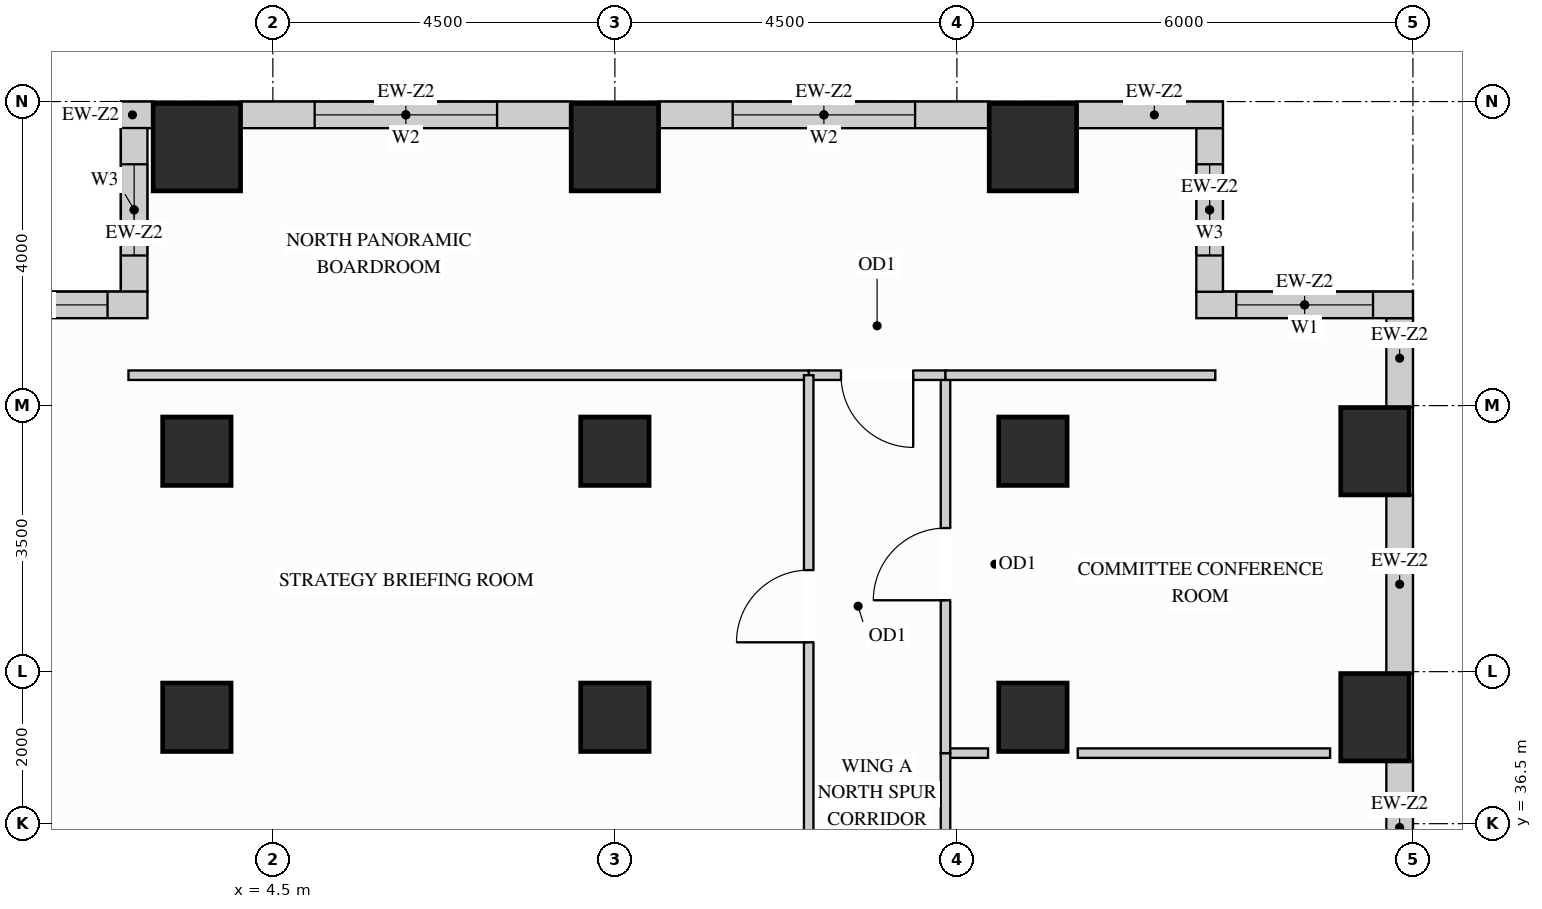
"""IFC4 building model, lengths in metres.
Left out: names, types, materials, properties, quantities, classifications, styles, units other than length and angle.
Written with IfcOpenShell. Run it as: python <this file> out.ifc"""

import sys

from ifc_helpers import new_model, si_unit, direction, frame, frame_2d, origin, origin_2d, place, context, subcontext, project, spatial, rectangle, extrude, source, transform, mapped, element, fill, save


model = new_model("IFC4")
c1 = context("Model", 3, precision=1e-05, world=origin(), true_north=direction((0.0, 1.0)))
c2 = subcontext(c1, "Body", "Model", "MODEL_VIEW")
j1 = project(units=[si_unit("LENGTHUNIT", "METRE"), si_unit("PLANEANGLEUNIT", "RADIAN")], contexts=[c1])
p1 = place(None, origin())
s1 = spatial("IfcSite", under=j1, at=p1, CompositionType="ELEMENT")
p2 = place(p1, origin())
s2 = spatial("IfcBuilding", under=s1, at=p2, CompositionType="ELEMENT")
p3 = place(p2, frame((0.0, 0.0, 88.2)))
s3 = spatial("IfcBuildingStorey", under=s2, at=p3, CompositionType="ELEMENT", Elevation=88.2)
m1 = source(origin(), c2, "Body", "SweptSolid", [
    extrude(rectangle(XDim=0.9, YDim=0.9, at=origin_2d()), origin(), (0.0, 0.0, 1.0), 3.38),
])
for number, where, z_axis, x_axis in (
    (1, (14.5, 37.9, 0.0), (0.0, 0.0, 1.0), (1.0, 0.0, 0.0)),
    (2, (14.5, 41.4, 0.0), (0.0, 0.0, 1.0), (1.0, 0.0, 0.0)),
    (3, (3.5, 37.9, 0.0), (0.0, 0.0, 1.0), (1.0, 0.0, 0.0)),
    (4, (3.5, 41.4, 0.0), (0.0, 0.0, 1.0), (1.0, 0.0, 0.0)),
    (5, (9.0, 37.9, 0.0), (0.0, 0.0, 1.0), (1.0, 0.0, 0.0)),
    (6, (9.0, 41.4, 0.0), (0.0, 0.0, 1.0), (1.0, 0.0, 0.0)),
):
    element("IfcColumn", number, at=place(p3, frame(where, z_axis=z_axis, x_axis=x_axis)), inside=s3, PredefinedType="COLUMN", context=c2, shape_type="MappedRepresentation", body=[
        mapped(m1, transform((0.0, 0.0, 0.0), x_axis=(1.0, 0.0, 0.0), y_axis=(0.0, 1.0, 0.0), z_axis=(0.0, 0.0, 1.0))),
    ])
m2 = source(origin(), c2, "Body", "SweptSolid", [
    extrude(rectangle(XDim=0.9, YDim=1.15, at=origin_2d()), origin(), (0.0, 0.0, 1.0), 3.38),
])
for number, where, z_axis, x_axis in (
    (7, (19.0, 37.9, 0.0), (0.0, 0.0, 1.0), (1.0, 0.0, 0.0)),
    (8, (19.0, 41.4, 0.0), (0.0, 0.0, 1.0), (1.0, 0.0, 0.0)),
):
    element("IfcColumn", number, at=place(p3, frame(where, z_axis=z_axis, x_axis=x_axis)), inside=s3, PredefinedType="COLUMN", context=c2, shape_type="MappedRepresentation", body=[
        mapped(m2, transform((0.0, 0.0, 0.0), x_axis=(1.0, 0.0, 0.0), y_axis=(0.0, 1.0, 0.0), z_axis=(0.0, 0.0, 1.0))),
    ])
m3 = source(origin(), c2, "Body", "SweptSolid", [
    extrude(rectangle(XDim=1.15, YDim=1.15, at=origin_2d()), origin(), (0.0, 0.0, 1.0), 3.38),
])
for number, where, z_axis, x_axis in (
    (9, (14.5, 45.4, 0.0), (0.0, 0.0, 1.0), (1.0, 0.0, 0.0)),
    (10, (3.5, 45.4, 0.0), (0.0, 0.0, 1.0), (1.0, 0.0, 0.0)),
    (11, (9.0, 45.4, 0.0), (0.0, 0.0, 1.0), (1.0, 0.0, 0.0)),
):
    element("IfcColumn", number, at=place(p3, frame(where, z_axis=z_axis, x_axis=x_axis)), inside=s3, PredefinedType="COLUMN", context=c2, shape_type="MappedRepresentation", body=[
        mapped(m3, transform((0.0, 0.0, 0.0), x_axis=(1.0, 0.0, 0.0), y_axis=(0.0, 1.0, 0.0), z_axis=(0.0, 0.0, 1.0))),
    ])
m4 = source(origin(), c2, "Body", "SweptSolid", [
    extrude(rectangle(XDim=1.754, YDim=0.35, at=frame_2d((0.877, 0.0))), origin(), (0.0, 0.0, 1.0), 2.519),
])
p4 = place(p3, frame((19.325, 35.573, 0.0), z_axis=(0.0, 0.0, 1.0), x_axis=(0.0, 1.0, 0.0)))
e12 = element("IfcWall", 12, at=p4, inside=s3, PredefinedType="SOLIDWALL", context=c2, shape_type="MappedRepresentation", body=[
    mapped(m4, transform((0.0, 0.0, 0.0), x_axis=(1.0, 0.0, 0.0), y_axis=(0.0, 1.0, 0.0), z_axis=(0.0, 0.0, 1.0))),
])
m5 = source(origin(), c2, "Body", "SweptSolid", [
    extrude(rectangle(XDim=2.354, YDim=0.35, at=frame_2d((1.177, 0.0))), origin(), (0.0, 0.0, 1.0), 2.519),
])
p5 = place(p3, frame((19.325, 38.473, 0.0), z_axis=(0.0, 0.0, 1.0), x_axis=(0.0, 1.0, 0.0)))
e13 = element("IfcWall", 13, at=p5, inside=s3, PredefinedType="SOLIDWALL", context=c2, shape_type="MappedRepresentation", body=[
    mapped(m5, transform((0.0, 0.0, 0.0), x_axis=(1.0, 0.0, 0.0), y_axis=(0.0, 1.0, 0.0), z_axis=(0.0, 0.0, 1.0))),
])
m6 = source(origin(), c2, "Body", "SweptSolid", [
    extrude(rectangle(XDim=1.179, YDim=0.35, at=frame_2d((0.59, 0.0))), origin(), (0.0, 0.0, 1.0), 3.365),
])
p6 = place(p3, frame((19.325, 41.973, 0.0), z_axis=(0.0, 0.0, 1.0), x_axis=(0.0, 1.0, 0.0)))
e14 = element("IfcWall", 14, at=p6, inside=s3, PredefinedType="SOLIDWALL", context=c2, shape_type="MappedRepresentation", body=[
    mapped(m6, transform((0.0, 0.0, 0.0), x_axis=(1.0, 0.0, 0.0), y_axis=(0.0, 1.0, 0.0), z_axis=(0.0, 0.0, 1.0))),
])
p7 = place(p3, frame((19.5, 43.325, 0.0), z_axis=(0.0, 0.0, 1.0), x_axis=(-1.0, 0.0, 0.0)))
e15 = element("IfcWall", 15, at=p7, inside=s3, PredefinedType="SOLIDWALL", context=c2, shape_type="SweptSolid", body=[
    extrude(rectangle(XDim=2.85, YDim=0.35, at=frame_2d((1.425, 0.0))), origin(), (0.0, 0.0, 1.0), 3.365),
])
p8 = place(p7, frame((0.525, 0.0, 0.78)))
e16 = element("IfcOpeningElement", 16, at=p8, cuts=e15, PredefinedType="OPENING", context=c2, shape_type="SweptSolid", body=[
    extrude(rectangle(XDim=1.8, YDim=2.1, at=frame_2d((0.9, 1.05))), frame((0.0, 0.185, 0.0), z_axis=(0.0, -1.0, 0.0), x_axis=(1.0, 0.0, 0.0)), (0.0, 0.0, 1.0), 0.37),
])
p9 = place(p3, frame((16.825, 43.498, 0.0), z_axis=(0.0, 0.0, 1.0), x_axis=(0.0, 1.0, 0.0)))
e17 = element("IfcWall", 17, at=p9, inside=s3, PredefinedType="SOLIDWALL", context=c2, shape_type="SweptSolid", body=[
    extrude(rectangle(XDim=2.154, YDim=0.35, at=frame_2d((1.077, 0.0))), origin(), (0.0, 0.0, 1.0), 3.365),
])
p10 = place(p9, frame((0.477, 0.0, 0.78)))
e18 = element("IfcOpeningElement", 18, at=p10, cuts=e17, PredefinedType="OPENING", context=c2, shape_type="SweptSolid", body=[
    extrude(rectangle(XDim=1.2, YDim=2.1, at=frame_2d((0.6, 1.05))), frame((0.0, 0.185, 0.0), z_axis=(0.0, -1.0, 0.0), x_axis=(1.0, 0.0, 0.0)), (0.0, 0.0, 1.0), 0.37),
])
m7 = source(origin(), c2, "Body", "SweptSolid", [
    extrude(rectangle(XDim=1.927, YDim=0.35, at=frame_2d((0.963, 0.0))), origin(), (0.0, 0.0, 1.0), 3.365),
])
p11 = place(p3, frame((17.0, 45.825, 0.0), z_axis=(0.0, 0.0, 1.0), x_axis=(-1.0, 0.0, 0.0)))
e19 = element("IfcWall", 19, at=p11, inside=s3, PredefinedType="SOLIDWALL", context=c2, shape_type="MappedRepresentation", body=[
    mapped(m7, transform((0.0, 0.0, 0.0), x_axis=(1.0, 0.0, 0.0), y_axis=(0.0, 1.0, 0.0), z_axis=(0.0, 0.0, 1.0))),
])
p12 = place(p3, frame((13.927, 45.825, 0.0), z_axis=(0.0, 0.0, 1.0), x_axis=(-1.0, 0.0, 0.0)))
e20 = element("IfcWall", 20, at=p12, inside=s3, PredefinedType="SOLIDWALL", context=c2, shape_type="SweptSolid", body=[
    extrude(rectangle(XDim=4.354, YDim=0.35, at=frame_2d((2.177, 0.0))), origin(), (0.0, 0.0, 1.0), 3.365),
])
p13 = place(p12, frame((0.977, 0.0, 0.78)))
e21 = element("IfcOpeningElement", 21, at=p13, cuts=e20, PredefinedType="OPENING", context=c2, shape_type="SweptSolid", body=[
    extrude(rectangle(XDim=2.4, YDim=2.1, at=frame_2d((1.2, 1.05))), frame((0.0, 0.185, 0.0), z_axis=(0.0, -1.0, 0.0), x_axis=(1.0, 0.0, 0.0)), (0.0, 0.0, 1.0), 0.37),
])
p14 = place(p3, frame((8.427, 45.825, 0.0), z_axis=(0.0, 0.0, 1.0), x_axis=(-1.0, 0.0, 0.0)))
e22 = element("IfcWall", 22, at=p14, inside=s3, PredefinedType="SOLIDWALL", context=c2, shape_type="SweptSolid", body=[
    extrude(rectangle(XDim=4.354, YDim=0.35, at=frame_2d((2.177, 0.0))), origin(), (0.0, 0.0, 1.0), 3.365),
])
p15 = place(p14, frame((0.977, 0.0, 0.78)))
e23 = element("IfcOpeningElement", 23, at=p15, cuts=e22, PredefinedType="OPENING", context=c2, shape_type="SweptSolid", body=[
    extrude(rectangle(XDim=2.4, YDim=2.1, at=frame_2d((1.2, 1.05))), frame((0.0, 0.185, 0.0), z_axis=(0.0, -1.0, 0.0), x_axis=(1.0, 0.0, 0.0)), (0.0, 0.0, 1.0), 0.37),
])
m8 = source(origin(), c2, "Body", "SweptSolid", [
    extrude(rectangle(XDim=0.427, YDim=0.35, at=frame_2d((0.213, 0.0))), origin(), (0.0, 0.0, 1.0), 3.365),
])
p16 = place(p3, frame((2.927, 45.825, 0.0), z_axis=(0.0, 0.0, 1.0), x_axis=(-1.0, 0.0, 0.0)))
e24 = element("IfcWall", 24, at=p16, inside=s3, PredefinedType="SOLIDWALL", context=c2, shape_type="MappedRepresentation", body=[
    mapped(m8, transform((0.0, 0.0, 0.0), x_axis=(1.0, 0.0, 0.0), y_axis=(0.0, 1.0, 0.0), z_axis=(0.0, 0.0, 1.0))),
])
p17 = place(p3, frame((2.675, 45.652, 0.0), z_axis=(0.0, 0.0, 1.0), x_axis=(0.0, -1.0, 0.0)))
e25 = element("IfcWall", 25, at=p17, inside=s3, PredefinedType="SOLIDWALL", context=c2, shape_type="SweptSolid", body=[
    extrude(rectangle(XDim=2.154, YDim=0.35, at=frame_2d((1.077, 0.0))), origin(), (0.0, 0.0, 1.0), 3.365),
])
p18 = place(p17, frame((0.477, 0.0, 0.78)))
e26 = element("IfcOpeningElement", 26, at=p18, cuts=e25, PredefinedType="OPENING", context=c2, shape_type="SweptSolid", body=[
    extrude(rectangle(XDim=1.2, YDim=2.1, at=frame_2d((0.6, 1.05))), frame((0.0, 0.185, 0.0), z_axis=(0.0, -1.0, 0.0), x_axis=(1.0, 0.0, 0.0)), (0.0, 0.0, 1.0), 0.37),
])
p19 = place(p3, frame((2.85, 43.325, 0.0), z_axis=(0.0, 0.0, 1.0), x_axis=(-1.0, 0.0, 0.0)))
e27 = element("IfcWall", 27, at=p19, inside=s3, PredefinedType="SOLIDWALL", context=c2, shape_type="SweptSolid", body=[
    extrude(rectangle(XDim=2.85, YDim=0.35, at=frame_2d((1.425, 0.0))), origin(), (0.0, 0.0, 1.0), 3.365),
])
p20 = place(p19, frame((0.525, 0.0, 0.78)))
e28 = element("IfcOpeningElement", 28, at=p20, cuts=e27, PredefinedType="OPENING", context=c2, shape_type="SweptSolid", body=[
    extrude(rectangle(XDim=1.8, YDim=2.1, at=frame_2d((0.9, 1.05))), frame((0.0, 0.185, 0.0), z_axis=(0.0, -1.0, 0.0), x_axis=(1.0, 0.0, 0.0)), (0.0, 0.0, 1.0), 0.37),
])
m9 = source(origin(), c2, "Body", "SweptSolid", [
    extrude(rectangle(XDim=0.56, YDim=0.125, at=frame_2d((0.28, 0.0))), origin(), (0.0, 0.0, 1.0), 3.365),
])
p21 = place(p3, frame((13.35, 37.428, 0.0), z_axis=(0.0, 0.0, 1.0), x_axis=(1.0, 0.0, 0.0)))
e29 = element("IfcWall", 29, at=p21, inside=s3, PredefinedType="PARTITIONING", context=c2, shape_type="MappedRepresentation", body=[
    mapped(m9, transform((0.0, 0.0, 0.0), x_axis=(1.0, 0.0, 0.0), y_axis=(0.0, 1.0, 0.0), z_axis=(0.0, 0.0, 1.0))),
])
m10 = source(origin(), c2, "Body", "SweptSolid", [
    extrude(rectangle(XDim=3.32, YDim=0.125, at=frame_2d((1.66, 0.0))), origin(), (0.0, 0.0, 1.0), 3.365),
])
p22 = place(p3, frame((15.09, 37.428, 0.0), z_axis=(0.0, 0.0, 1.0), x_axis=(1.0, 0.0, 0.0)))
e30 = element("IfcWall", 30, at=p22, inside=s3, PredefinedType="PARTITIONING", context=c2, shape_type="MappedRepresentation", body=[
    mapped(m10, transform((0.0, 0.0, 0.0), x_axis=(1.0, 0.0, 0.0), y_axis=(0.0, 1.0, 0.0), z_axis=(0.0, 0.0, 1.0))),
])
p23 = place(p3, frame((13.35, 31.35, 0.0), z_axis=(0.0, 0.0, 1.0), x_axis=(0.0, 1.0, 0.0)))
e31 = element("IfcWall", 31, at=p23, inside=s3, PredefinedType="PARTITIONING", context=c2, shape_type="SweptSolid", body=[
    extrude(rectangle(XDim=6.078, YDim=0.125, at=frame_2d((3.039, 0.0))), origin(), (0.0, 0.0, 1.0), 3.365),
])
p24 = place(p23, frame((2.564, 0.0, 0.0)))
e32 = element("IfcOpeningElement", 32, at=p24, cuts=e31, PredefinedType="OPENING", context=c2, shape_type="SweptSolid", body=[
    extrude(rectangle(XDim=0.95, YDim=2.15, at=frame_2d((0.475, 1.075))), frame((0.0, 0.073, 0.0), z_axis=(0.0, -1.0, 0.0), x_axis=(1.0, 0.0, 0.0)), (0.0, 0.0, 1.0), 0.145),
])
p25 = place(p3, frame((13.35, 37.428, 0.0), z_axis=(0.0, 0.0, 1.0), x_axis=(0.0, 1.0, 0.0)))
e33 = element("IfcWall", 33, at=p25, inside=s3, PredefinedType="PARTITIONING", context=c2, shape_type="SweptSolid", body=[
    extrude(rectangle(XDim=4.972, YDim=0.125, at=frame_2d((2.486, 0.0))), origin(), (0.0, 0.0, 1.0), 3.365),
])
p26 = place(p25, frame((2.011, 0.0, 0.0)))
e34 = element("IfcOpeningElement", 34, at=p26, cuts=e33, PredefinedType="OPENING", context=c2, shape_type="SweptSolid", body=[
    extrude(rectangle(XDim=0.95, YDim=2.15, at=frame_2d((0.475, 1.075))), frame((0.0, 0.073, 0.0), z_axis=(0.0, -1.0, 0.0), x_axis=(1.0, 0.0, 0.0)), (0.0, 0.0, 1.0), 0.145),
])
p27 = place(p3, frame((11.55, 42.4, 0.0), z_axis=(0.0, 0.0, 1.0), x_axis=(1.0, 0.0, 0.0)))
e35 = element("IfcWall", 35, at=p27, inside=s3, PredefinedType="PARTITIONING", context=c2, shape_type="SweptSolid", body=[
    extrude(rectangle(XDim=1.8, YDim=0.125, at=frame_2d((0.9, 0.0))), origin(), (0.0, 0.0, 1.0), 3.365),
])
p28 = place(p27, frame((0.425, 0.0, 0.0)))
e36 = element("IfcOpeningElement", 36, at=p28, cuts=e35, PredefinedType="OPENING", context=c2, shape_type="SweptSolid", body=[
    extrude(rectangle(XDim=0.95, YDim=2.15, at=frame_2d((0.475, 1.075))), frame((0.0, 0.073, 0.0), z_axis=(0.0, -1.0, 0.0), x_axis=(1.0, 0.0, 0.0)), (0.0, 0.0, 1.0), 0.145),
])
m11 = source(origin(), c2, "Body", "SweptSolid", [
    extrude(rectangle(XDim=3.55, YDim=0.125, at=frame_2d((1.775, 0.0))), origin(), (0.0, 0.0, 1.0), 3.365),
])
p29 = place(p3, frame((13.35, 42.4, 0.0), z_axis=(0.0, 0.0, 1.0), x_axis=(1.0, 0.0, 0.0)))
e37 = element("IfcWall", 37, at=p29, inside=s3, PredefinedType="PARTITIONING", context=c2, shape_type="MappedRepresentation", body=[
    mapped(m11, transform((0.0, 0.0, 0.0), x_axis=(1.0, 0.0, 0.0), y_axis=(0.0, 1.0, 0.0), z_axis=(0.0, 0.0, 1.0))),
])
m12 = source(origin(), c2, "Body", "SweptSolid", [
    extrude(rectangle(XDim=8.95, YDim=0.125, at=frame_2d((4.475, 0.0))), origin(), (0.0, 0.0, 1.0), 3.365),
])
p30 = place(p3, frame((2.6, 42.4, 0.0), z_axis=(0.0, 0.0, 1.0), x_axis=(1.0, 0.0, 0.0)))
e38 = element("IfcWall", 38, at=p30, inside=s3, PredefinedType="PARTITIONING", context=c2, shape_type="MappedRepresentation", body=[
    mapped(m12, transform((0.0, 0.0, 0.0), x_axis=(1.0, 0.0, 0.0), y_axis=(0.0, 1.0, 0.0), z_axis=(0.0, 0.0, 1.0))),
])
p31 = place(p3, frame((11.55, 36.322, 0.0), z_axis=(0.0, 0.0, 1.0), x_axis=(0.0, 1.0, 0.0)))
e39 = element("IfcWall", 39, at=p31, inside=s3, PredefinedType="PARTITIONING", context=c2, shape_type="SweptSolid", body=[
    extrude(rectangle(XDim=6.078, YDim=0.125, at=frame_2d((3.039, 0.0))), origin(), (0.0, 0.0, 1.0), 3.365),
])
p32 = place(p31, frame((2.564, 0.0, 0.0)))
e40 = element("IfcOpeningElement", 40, at=p32, cuts=e39, PredefinedType="OPENING", context=c2, shape_type="SweptSolid", body=[
    extrude(rectangle(XDim=0.95, YDim=2.15, at=frame_2d((0.475, 1.075))), frame((0.0, 0.073, 0.0), z_axis=(0.0, -1.0, 0.0), x_axis=(1.0, 0.0, 0.0)), (0.0, 0.0, 1.0), 0.145),
])
m13 = source(origin(), c2, "Body", "SweptSolid", [
    extrude(rectangle(XDim=0.95, YDim=2.15, at=frame_2d((0.475, 1.075))), frame((0.0, 0.025, 0.0), z_axis=(0.0, -1.0, 0.0), x_axis=(1.0, 0.0, 0.0)), (0.0, 0.0, 1.0), 0.05),
])
p33 = place(p26, origin())
e41 = element("IfcDoor", 41, at=p33, inside=s3, OperationType="SINGLE_SWING_LEFT", PredefinedType="DOOR", context=c2, shape_type="MappedRepresentation", body=[
    mapped(m13, transform((0.0, 0.0, 0.0), x_axis=(1.0, 0.0, 0.0), y_axis=(0.0, 1.0, 0.0), z_axis=(0.0, 0.0, 1.0))),
])
fill(e34, e41)
p34 = place(p28, origin())
e42 = element("IfcDoor", 42, at=p34, inside=s3, OperationType="SINGLE_SWING_RIGHT", PredefinedType="DOOR", context=c2, shape_type="MappedRepresentation", body=[
    mapped(m13, transform((0.0, 0.0, 0.0), x_axis=(1.0, 0.0, 0.0), y_axis=(0.0, 1.0, 0.0), z_axis=(0.0, 0.0, 1.0))),
])
fill(e36, e42)
p35 = place(p32, origin())
e43 = element("IfcDoor", 43, at=p35, inside=s3, OperationType="SINGLE_SWING_LEFT", PredefinedType="DOOR", context=c2, shape_type="MappedRepresentation", body=[
    mapped(m13, transform((0.0, 0.0, 0.0), x_axis=(1.0, 0.0, 0.0), y_axis=(0.0, 1.0, 0.0), z_axis=(0.0, 0.0, 1.0))),
])
fill(e40, e43)
m14 = source(origin(), c2, "Body", "SweptSolid", [
    extrude(rectangle(XDim=1.8, YDim=2.1, at=frame_2d((0.9, 1.05))), frame((0.0, 0.03, 0.0), z_axis=(0.0, -1.0, 0.0), x_axis=(1.0, 0.0, 0.0)), (0.0, 0.0, 1.0), 0.06),
])
p36 = place(p8, origin())
e44 = element("IfcWindow", 44, at=p36, inside=s3, PartitioningType="SINGLE_PANEL", PredefinedType="WINDOW", context=c2, shape_type="MappedRepresentation", body=[
    mapped(m14, transform((0.0, 0.0, 0.0), x_axis=(1.0, 0.0, 0.0), y_axis=(0.0, 1.0, 0.0), z_axis=(0.0, 0.0, 1.0))),
])
fill(e16, e44)
p37 = place(p20, origin())
e45 = element("IfcWindow", 45, at=p37, inside=s3, PartitioningType="SINGLE_PANEL", PredefinedType="WINDOW", context=c2, shape_type="MappedRepresentation", body=[
    mapped(m14, transform((0.0, 0.0, 0.0), x_axis=(1.0, 0.0, 0.0), y_axis=(0.0, 1.0, 0.0), z_axis=(0.0, 0.0, 1.0))),
])
fill(e28, e45)
m15 = source(origin(), c2, "Body", "SweptSolid", [
    extrude(rectangle(XDim=2.4, YDim=2.1, at=frame_2d((1.2, 1.05))), frame((0.0, 0.03, 0.0), z_axis=(0.0, -1.0, 0.0), x_axis=(1.0, 0.0, 0.0)), (0.0, 0.0, 1.0), 0.06),
])
p38 = place(p13, origin())
e46 = element("IfcWindow", 46, at=p38, inside=s3, PartitioningType="SINGLE_PANEL", PredefinedType="WINDOW", context=c2, shape_type="MappedRepresentation", body=[
    mapped(m15, transform((0.0, 0.0, 0.0), x_axis=(1.0, 0.0, 0.0), y_axis=(0.0, 1.0, 0.0), z_axis=(0.0, 0.0, 1.0))),
])
fill(e21, e46)
p39 = place(p15, origin())
e47 = element("IfcWindow", 47, at=p39, inside=s3, PartitioningType="SINGLE_PANEL", PredefinedType="WINDOW", context=c2, shape_type="MappedRepresentation", body=[
    mapped(m15, transform((0.0, 0.0, 0.0), x_axis=(1.0, 0.0, 0.0), y_axis=(0.0, 1.0, 0.0), z_axis=(0.0, 0.0, 1.0))),
])
fill(e23, e47)
m16 = source(origin(), c2, "Body", "SweptSolid", [
    extrude(rectangle(XDim=1.2, YDim=2.1, at=frame_2d((0.6, 1.05))), frame((0.0, 0.03, 0.0), z_axis=(0.0, -1.0, 0.0), x_axis=(1.0, 0.0, 0.0)), (0.0, 0.0, 1.0), 0.06),
])
p40 = place(p10, origin())
e48 = element("IfcWindow", 48, at=p40, inside=s3, PartitioningType="SINGLE_PANEL", PredefinedType="WINDOW", context=c2, shape_type="MappedRepresentation", body=[
    mapped(m16, transform((0.0, 0.0, 0.0), x_axis=(1.0, 0.0, 0.0), y_axis=(0.0, 1.0, 0.0), z_axis=(0.0, 0.0, 1.0))),
])
fill(e18, e48)
p41 = place(p18, origin())
e49 = element("IfcWindow", 49, at=p41, inside=s3, PartitioningType="SINGLE_PANEL", PredefinedType="WINDOW", context=c2, shape_type="MappedRepresentation", body=[
    mapped(m16, transform((0.0, 0.0, 0.0), x_axis=(1.0, 0.0, 0.0), y_axis=(0.0, 1.0, 0.0), z_axis=(0.0, 0.0, 1.0))),
])
fill(e26, e49)
save(model, sys.argv[1])
